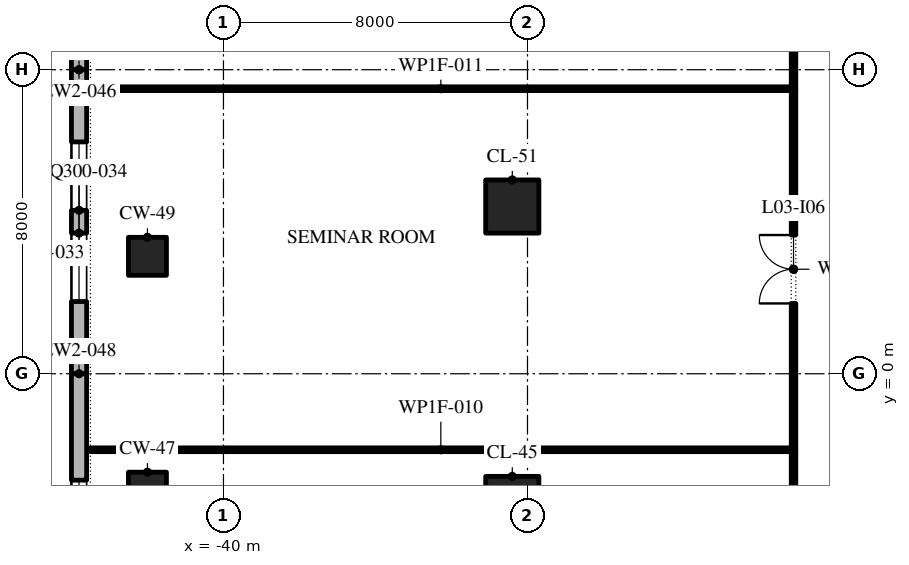
"""IFC4 building model, lengths in metres.
Left out: names, types, materials, properties, quantities, classifications, styles, units other than length and angle.
Written with IfcOpenShell. Run it as: python <this file> out.ifc"""

import sys

from ifc_helpers import new_model, si_unit, direction, frame, frame_2d, origin, origin_2d, place, context, subcontext, project, spatial, polyline, rectangle, outline, extrude, element, fill, save


model = new_model("IFC4")
c1 = context("Model", 3, precision=1e-05, world=origin(), true_north=direction((0.0, 1.0)))
c2 = subcontext(c1, "Body", "Model", "MODEL_VIEW")
j1 = project(units=[si_unit("LENGTHUNIT", "METRE"), si_unit("PLANEANGLEUNIT", "RADIAN")], contexts=[c1])
p1 = place(None, origin())
s1 = spatial("IfcSite", under=j1, at=p1, CompositionType="ELEMENT")
p2 = place(p1, origin())
s2 = spatial("IfcBuilding", under=s1, at=p2, CompositionType="ELEMENT")
p3 = place(p2, frame((0.0, 0.0, 19.2)))
s3 = spatial("IfcBuildingStorey", under=s2, at=p3, CompositionType="ELEMENT", Elevation=19.2)
p4 = place(p3, frame((-32.4, -3.4, 0.0), z_axis=(0.0, 0.0, 1.0), x_axis=(1.0, 0.0, 0.0)))
e1 = element("IfcColumn", 1, at=p4, inside=s3, PredefinedType="COLUMN", context=c2, shape_type="SweptSolid", body=[
    extrude(rectangle(XDim=1.4, YDim=1.4, at=origin_2d()), origin(), (0.0, 0.0, 1.0), 4.8),
])
for number, where, z_axis, x_axis in (
    (2, (-42.0, -3.09, 0.0), (0.0, 0.0, 1.0), (1.0, 0.0, 0.0)),
    (3, (-42.0, 3.09, 0.0), (0.0, 0.0, 1.0), (1.0, 0.0, 0.0)),
):
    element("IfcColumn", number, at=place(p3, frame(where, z_axis=z_axis, x_axis=x_axis)), inside=s3, PredefinedType="COLUMN", context=c2, shape_type="SweptSolid", body=[
        extrude(rectangle(XDim=1.0, YDim=1.0, at=origin_2d()), origin(), (0.0, 0.0, 1.0), 4.8),
    ])
p5 = place(p3, frame((-32.4, 4.4, 0.0), z_axis=(0.0, 0.0, 1.0), x_axis=(1.0, 0.0, 0.0)))
e4 = element("IfcColumn", 4, at=p5, inside=s3, PredefinedType="COLUMN", context=c2, shape_type="SweptSolid", body=[
    extrude(rectangle(XDim=1.4, YDim=1.4, at=origin_2d()), origin(), (0.0, 0.0, 1.0), 4.8),
])
p6 = place(p3, frame((-43.8, 16.0, 0.0), z_axis=(0.0, 0.0, 1.0), x_axis=(0.0, -1.0, 0.0)))
e5 = element("IfcWall", 5, at=p6, inside=s3, PredefinedType="STANDARD", context=c2, shape_type="SweptSolid", body=[
    extrude(rectangle(XDim=8.0, YDim=0.4, at=frame_2d((4.0, 0.0))), origin(), (0.0, 0.0, 1.0), 4.5),
])
p7 = place(p6, frame((1.9, 0.0, 0.9)))
e6 = element("IfcOpeningElement", 6, at=p7, cuts=e5, PredefinedType="OPENING", context=c2, shape_type="SweptSolid", body=[
    extrude(outline(polyline([(0.0, 0.0), (1.8, 0.0), (1.8, 1.5), (1.785, 1.729), (1.738, 1.954), (1.662, 2.17), (1.558, 2.375), (1.427, 2.563), (1.271, 2.732), (1.095, 2.879), (0.9, 3.0), (0.705, 2.879), (0.529, 2.732), (0.373, 2.563), (0.242, 2.375), (0.138, 2.17), (0.062, 1.954), (0.015, 1.729), (0.0, 1.5), (0.0, 0.0)])), frame((0.0, 0.21, 0.0), z_axis=(0.0, -1.0, 0.0), x_axis=(1.0, 0.0, 0.0)), (0.0, 0.0, 1.0), 0.42),
])
p8 = place(p6, frame((4.3, 0.0, 0.9)))
e7 = element("IfcOpeningElement", 7, at=p8, cuts=e5, PredefinedType="OPENING", context=c2, shape_type="SweptSolid", body=[
    extrude(outline(polyline([(0.0, 0.0), (1.8, 0.0), (1.8, 1.5), (1.785, 1.729), (1.738, 1.954), (1.662, 2.17), (1.558, 2.375), (1.427, 2.563), (1.271, 2.732), (1.095, 2.879), (0.9, 3.0), (0.705, 2.879), (0.529, 2.732), (0.373, 2.563), (0.242, 2.375), (0.138, 2.17), (0.062, 1.954), (0.015, 1.729), (0.0, 1.5), (0.0, 0.0)])), frame((0.0, 0.21, 0.0), z_axis=(0.0, -1.0, 0.0), x_axis=(1.0, 0.0, 0.0)), (0.0, 0.0, 1.0), 0.42),
])
p9 = place(p3, frame((-43.8, 8.0, 0.0), z_axis=(0.0, 0.0, 1.0), x_axis=(0.0, -1.0, 0.0)))
e8 = element("IfcWall", 8, at=p9, inside=s3, PredefinedType="STANDARD", context=c2, shape_type="SweptSolid", body=[
    extrude(rectangle(XDim=8.0, YDim=0.4, at=frame_2d((4.0, 0.0))), origin(), (0.0, 0.0, 1.0), 4.5),
])
p10 = place(p9, frame((1.9, 0.0, 0.9)))
e9 = element("IfcOpeningElement", 9, at=p10, cuts=e8, PredefinedType="OPENING", context=c2, shape_type="SweptSolid", body=[
    extrude(outline(polyline([(0.0, 0.0), (1.8, 0.0), (1.8, 1.5), (1.785, 1.729), (1.738, 1.954), (1.662, 2.17), (1.558, 2.375), (1.427, 2.563), (1.271, 2.732), (1.095, 2.879), (0.9, 3.0), (0.705, 2.879), (0.529, 2.732), (0.373, 2.563), (0.242, 2.375), (0.138, 2.17), (0.062, 1.954), (0.015, 1.729), (0.0, 1.5), (0.0, 0.0)])), frame((0.0, 0.21, 0.0), z_axis=(0.0, -1.0, 0.0), x_axis=(1.0, 0.0, 0.0)), (0.0, 0.0, 1.0), 0.42),
])
p11 = place(p9, frame((4.3, 0.0, 0.9)))
e10 = element("IfcOpeningElement", 10, at=p11, cuts=e8, PredefinedType="OPENING", context=c2, shape_type="SweptSolid", body=[
    extrude(outline(polyline([(0.0, 0.0), (1.8, 0.0), (1.8, 1.5), (1.785, 1.729), (1.738, 1.954), (1.662, 2.17), (1.558, 2.375), (1.427, 2.563), (1.271, 2.732), (1.095, 2.879), (0.9, 3.0), (0.705, 2.879), (0.529, 2.732), (0.373, 2.563), (0.242, 2.375), (0.138, 2.17), (0.062, 1.954), (0.015, 1.729), (0.0, 1.5), (0.0, 0.0)])), frame((0.0, 0.21, 0.0), z_axis=(0.0, -1.0, 0.0), x_axis=(1.0, 0.0, 0.0)), (0.0, 0.0, 1.0), 0.42),
])
p12 = place(p3, frame((-43.8, 0.0, 0.0), z_axis=(0.0, 0.0, 1.0), x_axis=(0.0, -1.0, 0.0)))
e11 = element("IfcWall", 11, at=p12, inside=s3, PredefinedType="STANDARD", context=c2, shape_type="SweptSolid", body=[
    extrude(rectangle(XDim=8.0, YDim=0.4, at=frame_2d((4.0, 0.0))), origin(), (0.0, 0.0, 1.0), 4.5),
])
p13 = place(p12, frame((2.8, 0.0, 0.9)))
e12 = element("IfcOpeningElement", 12, at=p13, cuts=e11, PredefinedType="OPENING", context=c2, shape_type="SweptSolid", body=[
    extrude(outline(polyline([(0.0, 0.0), (2.4, 0.0), (2.4, 1.5), (2.378, 1.758), (2.313, 2.009), (2.207, 2.245), (2.063, 2.46), (1.885, 2.648), (1.677, 2.804), (1.447, 2.922), (1.2, 3.0), (0.953, 2.922), (0.722, 2.804), (0.515, 2.648), (0.337, 2.46), (0.193, 2.245), (0.087, 2.009), (0.022, 1.758), (0.0, 1.5), (0.0, 0.0)])), frame((0.0, 0.21, 0.0), z_axis=(0.0, -1.0, 0.0), x_axis=(1.0, 0.0, 0.0)), (0.0, 0.0, 1.0), 0.42),
])
for number, where, z_axis, x_axis in (
    (13, (-43.5, -2.0, 0.0), (0.0, 0.0, 1.0), (1.0, 0.0, 0.0)),
    (14, (-43.5, 7.5, 0.0), (0.0, 0.0, 1.0), (1.0, 0.0, 0.0)),
):
    element("IfcWall", number, at=place(p3, frame(where, z_axis=z_axis, x_axis=x_axis)), inside=s3, PredefinedType="PARTITIONING", context=c2, shape_type="SweptSolid", body=[
        extrude(rectangle(XDim=18.44, YDim=0.1, at=frame_2d((9.22, 0.0))), origin(), (0.0, 0.0, 1.0), 4.5),
    ])
p14 = place(p3, frame((-25.0, -12.0, 0.0), z_axis=(0.0, 0.0, 1.0), x_axis=(0.0, 1.0, 0.0)))
e15 = element("IfcWall", 15, at=p14, inside=s3, PredefinedType="PARTITIONING", context=c2, shape_type="SweptSolid", body=[
    extrude(rectangle(XDim=10.0, YDim=0.12, at=frame_2d((5.0, 0.0))), origin(), (0.0, 0.0, 1.0), 4.5),
])
p15 = place(p14, frame((4.1, 0.0, 0.0)))
e16 = element("IfcOpeningElement", 16, at=p15, cuts=e15, PredefinedType="OPENING", context=c2, shape_type="SweptSolid", body=[
    extrude(rectangle(XDim=1.8, YDim=2.1, at=frame_2d((0.9, 1.05))), frame((0.0, 0.07, 0.0), z_axis=(0.0, -1.0, 0.0), x_axis=(1.0, 0.0, 0.0)), (0.0, 0.0, 1.0), 0.14),
])
p16 = place(p3, frame((-25.0, -2.0, 0.0), z_axis=(0.0, 0.0, 1.0), x_axis=(0.0, 1.0, 0.0)))
e17 = element("IfcWall", 17, at=p16, inside=s3, PredefinedType="PARTITIONING", context=c2, shape_type="SweptSolid", body=[
    extrude(rectangle(XDim=9.5, YDim=0.12, at=frame_2d((4.75, 0.0))), origin(), (0.0, 0.0, 1.0), 4.5),
])
p17 = place(p16, frame((3.85, 0.0, 0.0)))
e18 = element("IfcOpeningElement", 18, at=p17, cuts=e17, PredefinedType="OPENING", context=c2, shape_type="SweptSolid", body=[
    extrude(rectangle(XDim=1.8, YDim=2.1, at=frame_2d((0.9, 1.05))), frame((0.0, 0.07, 0.0), z_axis=(0.0, -1.0, 0.0), x_axis=(1.0, 0.0, 0.0)), (0.0, 0.0, 1.0), 0.14),
])
p18 = place(p3, frame((-25.0, 7.5, 0.0), z_axis=(0.0, 0.0, 1.0), x_axis=(0.0, 1.0, 0.0)))
e19 = element("IfcWall", 19, at=p18, inside=s3, PredefinedType="PARTITIONING", context=c2, shape_type="SweptSolid", body=[
    extrude(rectangle(XDim=9.5, YDim=0.12, at=frame_2d((4.75, 0.0))), origin(), (0.0, 0.0, 1.0), 4.5),
])
p19 = place(p18, frame((3.85, 0.0, 0.0)))
e20 = element("IfcOpeningElement", 20, at=p19, cuts=e19, PredefinedType="OPENING", context=c2, shape_type="SweptSolid", body=[
    extrude(rectangle(XDim=1.8, YDim=2.1, at=frame_2d((0.9, 1.05))), frame((0.0, 0.07, 0.0), z_axis=(0.0, -1.0, 0.0), x_axis=(1.0, 0.0, 0.0)), (0.0, 0.0, 1.0), 0.14),
])
p20 = place(p10, origin())
e21 = element("IfcWindow", 21, at=p20, inside=s3, PartitioningType="DOUBLE_PANEL_VERTICAL", PredefinedType="WINDOW", context=c2, shape_type="SweptSolid", body=[
    extrude(outline(polyline([(0.0, 0.0), (1.8, 0.0), (1.8, 1.5), (1.785, 1.729), (1.738, 1.954), (1.662, 2.17), (1.558, 2.375), (1.427, 2.563), (1.271, 2.732), (1.095, 2.879), (0.9, 3.0), (0.705, 2.879), (0.529, 2.732), (0.373, 2.563), (0.242, 2.375), (0.138, 2.17), (0.062, 1.954), (0.015, 1.729), (0.0, 1.5), (0.0, 0.0)])), frame((0.0, 0.03, 0.0), z_axis=(0.0, -1.0, 0.0), x_axis=(1.0, 0.0, 0.0)), (0.0, 0.0, 1.0), 0.06),
])
fill(e9, e21)
p21 = place(p11, origin())
e22 = element("IfcWindow", 22, at=p21, inside=s3, PartitioningType="DOUBLE_PANEL_VERTICAL", PredefinedType="WINDOW", context=c2, shape_type="SweptSolid", body=[
    extrude(outline(polyline([(0.0, 0.0), (1.8, 0.0), (1.8, 1.5), (1.785, 1.729), (1.738, 1.954), (1.662, 2.17), (1.558, 2.375), (1.427, 2.563), (1.271, 2.732), (1.095, 2.879), (0.9, 3.0), (0.705, 2.879), (0.529, 2.732), (0.373, 2.563), (0.242, 2.375), (0.138, 2.17), (0.062, 1.954), (0.015, 1.729), (0.0, 1.5), (0.0, 0.0)])), frame((0.0, 0.03, 0.0), z_axis=(0.0, -1.0, 0.0), x_axis=(1.0, 0.0, 0.0)), (0.0, 0.0, 1.0), 0.06),
])
fill(e10, e22)
p22 = place(p13, origin())
e23 = element("IfcWindow", 23, at=p22, inside=s3, PartitioningType="DOUBLE_PANEL_VERTICAL", PredefinedType="WINDOW", context=c2, shape_type="SweptSolid", body=[
    extrude(outline(polyline([(0.0, 0.0), (2.4, 0.0), (2.4, 1.5), (2.378, 1.758), (2.313, 2.009), (2.207, 2.245), (2.063, 2.46), (1.885, 2.648), (1.677, 2.804), (1.447, 2.922), (1.2, 3.0), (0.953, 2.922), (0.722, 2.804), (0.515, 2.648), (0.337, 2.46), (0.193, 2.245), (0.087, 2.009), (0.022, 1.758), (0.0, 1.5), (0.0, 0.0)])), frame((0.0, 0.03, 0.0), z_axis=(0.0, -1.0, 0.0), x_axis=(1.0, 0.0, 0.0)), (0.0, 0.0, 1.0), 0.06),
])
fill(e12, e23)
p23 = place(p17, origin())
e24 = element("IfcDoor", 24, at=p23, inside=s3, OperationType="SINGLE_SWING_RIGHT", PredefinedType="DOOR", context=c2, shape_type="SweptSolid", body=[
    extrude(rectangle(XDim=1.8, YDim=2.1, at=frame_2d((0.9, 1.05))), frame((0.0, 0.025, 0.0), z_axis=(0.0, -1.0, 0.0), x_axis=(1.0, 0.0, 0.0)), (0.0, 0.0, 1.0), 0.05),
])
fill(e18, e24)
save(model, sys.argv[1])
